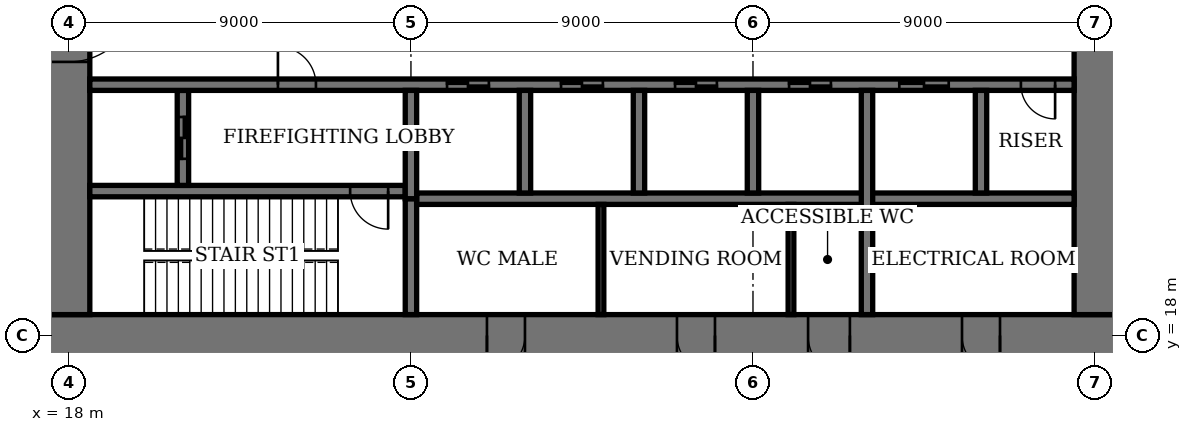
"""IFC4 building model, lengths in metres.
Left out: names, types, materials, properties, quantities, classifications, styles, units other than length and angle.
Written with IfcOpenShell. Run it as: python <this file> out.ifc"""

import sys

from ifc_helpers import new_model, si_unit, direction, frame, frame_2d, origin, place, context, subcontext, project, spatial, rectangle, extrude, element, fill, save


model = new_model("IFC4")
c1 = context("Model", 3, precision=1e-05, world=origin(), true_north=direction((0.0, 1.0)))
c2 = subcontext(c1, "Body", "Model", "MODEL_VIEW")
j1 = project(units=[si_unit("LENGTHUNIT", "METRE"), si_unit("PLANEANGLEUNIT", "RADIAN")], contexts=[c1])
p1 = place(None, origin())
s1 = spatial("IfcSite", under=j1, at=p1, CompositionType="ELEMENT")
p2 = place(p1, origin())
s2 = spatial("IfcBuilding", under=s1, at=p2, CompositionType="ELEMENT")
p3 = place(p2, frame((0.0, 0.0, 5.4)))
s3 = spatial("IfcBuildingStorey", under=s2, at=p3, CompositionType="ELEMENT", Elevation=5.4)
p4 = place(p3, frame((17.45, 18.0, 0.0), z_axis=(0.0, 0.0, 1.0), x_axis=(1.0, 0.0, 0.0)))
e1 = element("IfcWall", 1, at=p4, inside=s3, PredefinedType="SHEAR", context=c2, shape_type="SweptSolid", body=[
    extrude(rectangle(XDim=28.1, YDim=1.1, at=frame_2d((14.05, 0.0))), origin(), (0.0, 0.0, 1.0), 5.4),
])
p5 = place(p4, frame((11.55, 0.0, 0.0)))
e2 = element("IfcOpeningElement", 2, at=p5, cuts=e1, PredefinedType="OPENING", context=c2, shape_type="SweptSolid", body=[
    extrude(rectangle(XDim=1.0, YDim=2.4, at=frame_2d((0.5, 1.2))), frame((0.0, 0.56, 0.0), z_axis=(0.0, -1.0, 0.0), x_axis=(1.0, 0.0, 0.0)), (0.0, 0.0, 1.0), 1.12),
])
p6 = place(p4, frame((16.55, 0.0, 0.0)))
e3 = element("IfcOpeningElement", 3, at=p6, cuts=e1, PredefinedType="OPENING", context=c2, shape_type="SweptSolid", body=[
    extrude(rectangle(XDim=1.0, YDim=2.4, at=frame_2d((0.5, 1.2))), frame((0.0, 0.56, 0.0), z_axis=(0.0, -1.0, 0.0), x_axis=(1.0, 0.0, 0.0)), (0.0, 0.0, 1.0), 1.12),
])
p7 = place(p4, frame((20.0, 0.0, 0.0)))
e4 = element("IfcOpeningElement", 4, at=p7, cuts=e1, PredefinedType="OPENING", context=c2, shape_type="SweptSolid", body=[
    extrude(rectangle(XDim=1.1, YDim=2.4, at=frame_2d((0.55, 1.2))), frame((0.0, 0.56, 0.0), z_axis=(0.0, -1.0, 0.0), x_axis=(1.0, 0.0, 0.0)), (0.0, 0.0, 1.0), 1.12),
])
p8 = place(p4, frame((24.05, 0.0, 0.0)))
e5 = element("IfcOpeningElement", 5, at=p8, cuts=e1, PredefinedType="OPENING", context=c2, shape_type="SweptSolid", body=[
    extrude(rectangle(XDim=1.0, YDim=2.4, at=frame_2d((0.5, 1.2))), frame((0.0, 0.56, 0.0), z_axis=(0.0, -1.0, 0.0), x_axis=(1.0, 0.0, 0.0)), (0.0, 0.0, 1.0), 1.12),
])
p9 = place(p3, frame((18.0, 35.45, 0.0), z_axis=(0.0, 0.0, 1.0), x_axis=(0.0, -1.0, 0.0)))
e6 = element("IfcWall", 6, at=p9, inside=s3, PredefinedType="SHEAR", context=c2, shape_type="SweptSolid", body=[
    extrude(rectangle(XDim=16.9, YDim=1.1, at=frame_2d((8.45, 0.0))), origin(), (0.0, 0.0, 1.0), 5.4),
])
p10 = place(p9, frame((8.45, 0.0, 0.0)))
e7 = element("IfcOpeningElement", 7, at=p10, cuts=e6, PredefinedType="OPENING", context=c2, shape_type="SweptSolid", body=[
    extrude(rectangle(XDim=1.8, YDim=2.4, at=frame_2d((0.9, 1.2))), frame((0.0, 0.56, 0.0), z_axis=(0.0, -1.0, 0.0), x_axis=(1.0, 0.0, 0.0)), (0.0, 0.0, 1.0), 1.12),
])
p11 = place(p3, frame((45.0, 18.55, 0.0), z_axis=(0.0, 0.0, 1.0), x_axis=(0.0, 1.0, 0.0)))
e8 = element("IfcWall", 8, at=p11, inside=s3, PredefinedType="SHEAR", context=c2, shape_type="SweptSolid", body=[
    extrude(rectangle(XDim=16.9, YDim=1.1, at=frame_2d((8.45, 0.0))), origin(), (0.0, 0.0, 1.0), 5.4),
])
p12 = place(p11, frame((8.45, 0.0, 0.0)))
e9 = element("IfcOpeningElement", 9, at=p12, cuts=e8, PredefinedType="OPENING", context=c2, shape_type="SweptSolid", body=[
    extrude(rectangle(XDim=1.8, YDim=2.4, at=frame_2d((0.9, 1.2))), frame((0.0, 0.56, 0.0), z_axis=(0.0, -1.0, 0.0), x_axis=(1.0, 0.0, 0.0)), (0.0, 0.0, 1.0), 1.12),
])
p13 = place(p3, frame((18.55, 21.8, 0.0), z_axis=(0.0, 0.0, 1.0), x_axis=(1.0, 0.0, 0.0)))
e10 = element("IfcWall", 10, at=p13, inside=s3, PredefinedType="SHEAR", context=c2, shape_type="SweptSolid", body=[
    extrude(rectangle(XDim=8.3, YDim=0.3, at=frame_2d((4.15, 0.0))), origin(), (0.0, 0.0, 1.0), 5.4),
])
p14 = place(p13, frame((6.85, 0.0, 0.0)))
e11 = element("IfcOpeningElement", 11, at=p14, cuts=e10, PredefinedType="OPENING", context=c2, shape_type="SweptSolid", body=[
    extrude(rectangle(XDim=1.0, YDim=2.4, at=frame_2d((0.5, 1.2))), frame((0.0, 0.16, 0.0), z_axis=(0.0, -1.0, 0.0), x_axis=(1.0, 0.0, 0.0)), (0.0, 0.0, 1.0), 0.32),
])
p15 = place(p3, frame((27.0, 18.55, 0.0), z_axis=(0.0, 0.0, 1.0), x_axis=(0.0, 1.0, 0.0)))
e12 = element("IfcWall", 12, at=p15, inside=s3, PredefinedType="SHEAR", context=c2, shape_type="SweptSolid", body=[
    extrude(rectangle(XDim=3.05, YDim=0.3, at=frame_2d((1.525, 0.0))), origin(), (0.0, 0.0, 1.0), 5.4),
])
p16 = place(p3, frame((21.0, 21.95, 0.0), z_axis=(0.0, 0.0, 1.0), x_axis=(0.0, 1.0, 0.0)))
e13 = element("IfcWall", 13, at=p16, inside=s3, PredefinedType="SHEAR", context=c2, shape_type="SweptSolid", body=[
    extrude(rectangle(XDim=2.5, YDim=0.3, at=frame_2d((1.25, 0.0))), origin(), (0.0, 0.0, 1.0), 5.4),
])
p17 = place(p16, frame((0.7, 0.0, 0.0)))
e14 = element("IfcOpeningElement", 14, at=p17, cuts=e13, PredefinedType="OPENING", context=c2, shape_type="SweptSolid", body=[
    extrude(rectangle(XDim=1.1, YDim=2.4, at=frame_2d((0.55, 1.2))), frame((0.0, 0.16, 0.0), z_axis=(0.0, -1.0, 0.0), x_axis=(1.0, 0.0, 0.0)), (0.0, 0.0, 1.0), 0.32),
])
p18 = place(p3, frame((18.55, 24.6, 0.0), z_axis=(0.0, 0.0, 1.0), x_axis=(1.0, 0.0, 0.0)))
e15 = element("IfcWall", 15, at=p18, inside=s3, PredefinedType="SHEAR", context=c2, shape_type="SweptSolid", body=[
    extrude(rectangle(XDim=25.9, YDim=0.3, at=frame_2d((12.95, 0.0))), origin(), (0.0, 0.0, 1.0), 5.4),
])
p19 = place(p18, frame((4.95, 0.0, 0.0)))
e16 = element("IfcOpeningElement", 16, at=p19, cuts=e15, PredefinedType="OPENING", context=c2, shape_type="SweptSolid", body=[
    extrude(rectangle(XDim=1.0, YDim=2.4, at=frame_2d((0.5, 1.2))), frame((0.0, 0.16, 0.0), z_axis=(0.0, -1.0, 0.0), x_axis=(1.0, 0.0, 0.0)), (0.0, 0.0, 1.0), 0.32),
])
p20 = place(p18, frame((24.5, 0.0, 0.0)))
e17 = element("IfcOpeningElement", 17, at=p20, cuts=e15, PredefinedType="OPENING", context=c2, shape_type="SweptSolid", body=[
    extrude(rectangle(XDim=0.9, YDim=2.1, at=frame_2d((0.45, 1.05))), frame((0.0, 0.16, 0.0), z_axis=(0.0, -1.0, 0.0), x_axis=(1.0, 0.0, 0.0)), (0.0, 0.0, 1.0), 0.32),
])
p21 = place(p18, frame((9.4, 0.0, 0.0)))
e18 = element("IfcOpeningElement", 18, at=p21, cuts=e15, PredefinedType="OPENING", context=c2, shape_type="SweptSolid", body=[
    extrude(rectangle(XDim=1.1, YDim=2.4, at=frame_2d((0.55, 1.2))), frame((0.0, 0.16, 0.0), z_axis=(0.0, -1.0, 0.0), x_axis=(1.0, 0.0, 0.0)), (0.0, 0.0, 1.0), 0.32),
])
p22 = place(p18, frame((12.4, 0.0, 0.0)))
e19 = element("IfcOpeningElement", 19, at=p22, cuts=e15, PredefinedType="OPENING", context=c2, shape_type="SweptSolid", body=[
    extrude(rectangle(XDim=1.1, YDim=2.4, at=frame_2d((0.55, 1.2))), frame((0.0, 0.16, 0.0), z_axis=(0.0, -1.0, 0.0), x_axis=(1.0, 0.0, 0.0)), (0.0, 0.0, 1.0), 0.32),
])
p23 = place(p18, frame((15.4, 0.0, 0.0)))
e20 = element("IfcOpeningElement", 20, at=p23, cuts=e15, PredefinedType="OPENING", context=c2, shape_type="SweptSolid", body=[
    extrude(rectangle(XDim=1.1, YDim=2.4, at=frame_2d((0.55, 1.2))), frame((0.0, 0.16, 0.0), z_axis=(0.0, -1.0, 0.0), x_axis=(1.0, 0.0, 0.0)), (0.0, 0.0, 1.0), 0.32),
])
p24 = place(p18, frame((18.4, 0.0, 0.0)))
e21 = element("IfcOpeningElement", 21, at=p24, cuts=e15, PredefinedType="OPENING", context=c2, shape_type="SweptSolid", body=[
    extrude(rectangle(XDim=1.1, YDim=2.4, at=frame_2d((0.55, 1.2))), frame((0.0, 0.16, 0.0), z_axis=(0.0, -1.0, 0.0), x_axis=(1.0, 0.0, 0.0)), (0.0, 0.0, 1.0), 0.32),
])
p25 = place(p18, frame((21.3, 0.0, 0.0)))
e22 = element("IfcOpeningElement", 22, at=p25, cuts=e15, PredefinedType="OPENING", context=c2, shape_type="SweptSolid", body=[
    extrude(rectangle(XDim=1.3, YDim=2.4, at=frame_2d((0.65, 1.2))), frame((0.0, 0.16, 0.0), z_axis=(0.0, -1.0, 0.0), x_axis=(1.0, 0.0, 0.0)), (0.0, 0.0, 1.0), 0.32),
])
p26 = place(p3, frame((27.15, 21.6, 0.0), z_axis=(0.0, 0.0, 1.0), x_axis=(1.0, 0.0, 0.0)))
e23 = element("IfcWall", 23, at=p26, inside=s3, PredefinedType="SHEAR", context=c2, shape_type="SweptSolid", body=[
    extrude(rectangle(XDim=17.3, YDim=0.3, at=frame_2d((8.65, 0.0))), origin(), (0.0, 0.0, 1.0), 5.4),
])
for number, where, z_axis, x_axis in (
    (24, (30.0, 21.75, 0.0), (0.0, 0.0, 1.0), (0.0, 1.0, 0.0)),
    (25, (33.0, 21.75, 0.0), (0.0, 0.0, 1.0), (0.0, 1.0, 0.0)),
    (26, (36.0, 21.75, 0.0), (0.0, 0.0, 1.0), (0.0, 1.0, 0.0)),
):
    element("IfcWall", number, at=place(p3, frame(where, z_axis=z_axis, x_axis=x_axis)), inside=s3, PredefinedType="SHEAR", context=c2, shape_type="SweptSolid", body=[
        extrude(rectangle(XDim=2.7, YDim=0.3, at=frame_2d((1.35, 0.0))), origin(), (0.0, 0.0, 1.0), 5.4),
    ])
p27 = place(p3, frame((39.0, 18.55, 0.0), z_axis=(0.0, 0.0, 1.0), x_axis=(0.0, 1.0, 0.0)))
e27 = element("IfcWall", 27, at=p27, inside=s3, PredefinedType="SHEAR", context=c2, shape_type="SweptSolid", body=[
    extrude(rectangle(XDim=5.9, YDim=0.3, at=frame_2d((2.95, 0.0))), origin(), (0.0, 0.0, 1.0), 5.4),
])
p28 = place(p3, frame((42.0, 21.75, 0.0), z_axis=(0.0, 0.0, 1.0), x_axis=(0.0, 1.0, 0.0)))
e28 = element("IfcWall", 28, at=p28, inside=s3, PredefinedType="SHEAR", context=c2, shape_type="SweptSolid", body=[
    extrude(rectangle(XDim=2.7, YDim=0.3, at=frame_2d((1.35, 0.0))), origin(), (0.0, 0.0, 1.0), 5.4),
])
p29 = place(p3, frame((27.0, 21.6, 0.0), z_axis=(0.0, 0.0, 1.0), x_axis=(0.0, 1.0, 0.0)))
e29 = element("IfcWall", 29, at=p29, inside=s3, PredefinedType="SHEAR", context=c2, shape_type="SweptSolid", body=[
    extrude(rectangle(XDim=2.85, YDim=0.3, at=frame_2d((1.425, 0.0))), origin(), (0.0, 0.0, 1.0), 5.4),
])
for number, where, z_axis, x_axis in (
    (30, (32.0, 18.55, 0.0), (0.0, 0.0, 1.0), (0.0, 1.0, 0.0)),
    (31, (37.0, 18.55, 0.0), (0.0, 0.0, 1.0), (0.0, 1.0, 0.0)),
):
    element("IfcWall", number, at=place(p3, frame(where, z_axis=z_axis, x_axis=x_axis)), inside=s3, PredefinedType="PARTITIONING", context=c2, shape_type="SweptSolid", body=[
        extrude(rectangle(XDim=2.9, YDim=0.15, at=frame_2d((1.45, 0.0))), origin(), (0.0, 0.0, 1.0), 5.1),
    ])
p30 = place(p10, origin())
e32 = element("IfcDoor", 32, at=p30, inside=s3, OperationType="DOUBLE_DOOR_DOUBLE_SWING", PredefinedType="DOOR", context=c2, shape_type="SweptSolid", body=[
    extrude(rectangle(XDim=1.8, YDim=2.4, at=frame_2d((0.9, 1.2))), frame((0.0, 0.03, 0.0), z_axis=(0.0, -1.0, 0.0), x_axis=(1.0, 0.0, 0.0)), (0.0, 0.0, 1.0), 0.06),
    extrude(rectangle(XDim=0.04, YDim=2.4, at=frame_2d((0.02, 1.2))), frame((0.0, 0.55, 0.0), z_axis=(0.0, -1.0, 0.0), x_axis=(1.0, 0.0, 0.0)), (0.0, 0.0, 1.0), 1.1),
    extrude(rectangle(XDim=0.04, YDim=2.4, at=frame_2d((1.78, 1.2))), frame((0.0, 0.55, 0.0), z_axis=(0.0, -1.0, 0.0), x_axis=(1.0, 0.0, 0.0)), (0.0, 0.0, 1.0), 1.1),
    extrude(rectangle(XDim=1.8, YDim=0.04, at=frame_2d((0.9, 2.38))), frame((0.0, 0.55, 0.0), z_axis=(0.0, -1.0, 0.0), x_axis=(1.0, 0.0, 0.0)), (0.0, 0.0, 1.0), 1.1),
])
fill(e7, e32)
p31 = place(p5, origin())
e33 = element("IfcDoor", 33, at=p31, inside=s3, OperationType="SINGLE_SWING_LEFT", PredefinedType="DOOR", context=c2, shape_type="SweptSolid", body=[
    extrude(rectangle(XDim=1.0, YDim=2.4, at=frame_2d((0.5, 1.2))), frame((0.0, 0.025, 0.0), z_axis=(0.0, -1.0, 0.0), x_axis=(1.0, 0.0, 0.0)), (0.0, 0.0, 1.0), 0.05),
    extrude(rectangle(XDim=0.04, YDim=2.4, at=frame_2d((0.02, 1.2))), frame((0.0, 0.4, 0.0), z_axis=(0.0, -1.0, 0.0), x_axis=(1.0, 0.0, 0.0)), (0.0, 0.0, 1.0), 0.8),
    extrude(rectangle(XDim=0.04, YDim=2.4, at=frame_2d((0.98, 1.2))), frame((0.0, 0.4, 0.0), z_axis=(0.0, -1.0, 0.0), x_axis=(1.0, 0.0, 0.0)), (0.0, 0.0, 1.0), 0.8),
    extrude(rectangle(XDim=1.0, YDim=0.04, at=frame_2d((0.5, 2.38))), frame((0.0, 0.4, 0.0), z_axis=(0.0, -1.0, 0.0), x_axis=(1.0, 0.0, 0.0)), (0.0, 0.0, 1.0), 0.8),
])
fill(e2, e33)
p32 = place(p6, origin())
e34 = element("IfcDoor", 34, at=p32, inside=s3, OperationType="SINGLE_SWING_RIGHT", PredefinedType="DOOR", context=c2, shape_type="SweptSolid", body=[
    extrude(rectangle(XDim=1.0, YDim=2.4, at=frame_2d((0.5, 1.2))), frame((0.0, 0.025, 0.0), z_axis=(0.0, -1.0, 0.0), x_axis=(1.0, 0.0, 0.0)), (0.0, 0.0, 1.0), 0.05),
    extrude(rectangle(XDim=0.04, YDim=2.4, at=frame_2d((0.02, 1.2))), frame((0.0, 0.4, 0.0), z_axis=(0.0, -1.0, 0.0), x_axis=(1.0, 0.0, 0.0)), (0.0, 0.0, 1.0), 0.8),
    extrude(rectangle(XDim=0.04, YDim=2.4, at=frame_2d((0.98, 1.2))), frame((0.0, 0.4, 0.0), z_axis=(0.0, -1.0, 0.0), x_axis=(1.0, 0.0, 0.0)), (0.0, 0.0, 1.0), 0.8),
    extrude(rectangle(XDim=1.0, YDim=0.04, at=frame_2d((0.5, 2.38))), frame((0.0, 0.4, 0.0), z_axis=(0.0, -1.0, 0.0), x_axis=(1.0, 0.0, 0.0)), (0.0, 0.0, 1.0), 0.8),
])
fill(e3, e34)
p33 = place(p7, origin())
e35 = element("IfcDoor", 35, at=p33, inside=s3, OperationType="SINGLE_SWING_RIGHT", PredefinedType="DOOR", context=c2, shape_type="SweptSolid", body=[
    extrude(rectangle(XDim=1.1, YDim=2.4, at=frame_2d((0.55, 1.2))), frame((0.0, 0.025, 0.0), z_axis=(0.0, -1.0, 0.0), x_axis=(1.0, 0.0, 0.0)), (0.0, 0.0, 1.0), 0.05),
    extrude(rectangle(XDim=0.04, YDim=2.4, at=frame_2d((0.02, 1.2))), frame((0.0, 0.44, 0.0), z_axis=(0.0, -1.0, 0.0), x_axis=(1.0, 0.0, 0.0)), (0.0, 0.0, 1.0), 0.88),
    extrude(rectangle(XDim=0.04, YDim=2.4, at=frame_2d((1.08, 1.2))), frame((0.0, 0.44, 0.0), z_axis=(0.0, -1.0, 0.0), x_axis=(1.0, 0.0, 0.0)), (0.0, 0.0, 1.0), 0.88),
    extrude(rectangle(XDim=1.1, YDim=0.04, at=frame_2d((0.55, 2.38))), frame((0.0, 0.44, 0.0), z_axis=(0.0, -1.0, 0.0), x_axis=(1.0, 0.0, 0.0)), (0.0, 0.0, 1.0), 0.88),
])
fill(e4, e35)
p34 = place(p8, origin())
e36 = element("IfcDoor", 36, at=p34, inside=s3, OperationType="SINGLE_SWING_RIGHT", PredefinedType="DOOR", context=c2, shape_type="SweptSolid", body=[
    extrude(rectangle(XDim=1.0, YDim=2.4, at=frame_2d((0.5, 1.2))), frame((0.0, 0.025, 0.0), z_axis=(0.0, -1.0, 0.0), x_axis=(1.0, 0.0, 0.0)), (0.0, 0.0, 1.0), 0.05),
    extrude(rectangle(XDim=0.04, YDim=2.4, at=frame_2d((0.02, 1.2))), frame((0.0, 0.4, 0.0), z_axis=(0.0, -1.0, 0.0), x_axis=(1.0, 0.0, 0.0)), (0.0, 0.0, 1.0), 0.8),
    extrude(rectangle(XDim=0.04, YDim=2.4, at=frame_2d((0.98, 1.2))), frame((0.0, 0.4, 0.0), z_axis=(0.0, -1.0, 0.0), x_axis=(1.0, 0.0, 0.0)), (0.0, 0.0, 1.0), 0.8),
    extrude(rectangle(XDim=1.0, YDim=0.04, at=frame_2d((0.5, 2.38))), frame((0.0, 0.4, 0.0), z_axis=(0.0, -1.0, 0.0), x_axis=(1.0, 0.0, 0.0)), (0.0, 0.0, 1.0), 0.8),
])
fill(e5, e36)
p35 = place(p14, origin())
e37 = element("IfcDoor", 37, at=p35, inside=s3, OperationType="SINGLE_SWING_RIGHT", PredefinedType="DOOR", context=c2, shape_type="SweptSolid", body=[
    extrude(rectangle(XDim=1.0, YDim=2.4, at=frame_2d((0.5, 1.2))), frame((0.0, 0.03, 0.0), z_axis=(0.0, -1.0, 0.0), x_axis=(1.0, 0.0, 0.0)), (0.0, 0.0, 1.0), 0.06),
])
fill(e11, e37)
p36 = place(p19, origin())
e38 = element("IfcDoor", 38, at=p36, inside=s3, OperationType="SINGLE_SWING_RIGHT", PredefinedType="DOOR", context=c2, shape_type="SweptSolid", body=[
    extrude(rectangle(XDim=1.0, YDim=2.4, at=frame_2d((0.5, 1.2))), frame((0.0, 0.03, 0.0), z_axis=(0.0, -1.0, 0.0), x_axis=(1.0, 0.0, 0.0)), (0.0, 0.0, 1.0), 0.06),
])
fill(e16, e38)
p37 = place(p20, origin())
e39 = element("IfcDoor", 39, at=p37, inside=s3, OperationType="SINGLE_SWING_RIGHT", PredefinedType="DOOR", context=c2, shape_type="SweptSolid", body=[
    extrude(rectangle(XDim=0.9, YDim=2.1, at=frame_2d((0.45, 1.05))), frame((0.0, 0.03, 0.0), z_axis=(0.0, -1.0, 0.0), x_axis=(1.0, 0.0, 0.0)), (0.0, 0.0, 1.0), 0.06),
])
fill(e17, e39)
p38 = place(p21, origin())
e40 = element("IfcDoor", 40, at=p38, inside=s3, OperationType="DOUBLE_DOOR_SLIDING", PredefinedType="DOOR", context=c2, shape_type="SweptSolid", body=[
    extrude(rectangle(XDim=1.1, YDim=2.4, at=frame_2d((0.55, 1.2))), frame((0.0, 0.02, 0.0), z_axis=(0.0, -1.0, 0.0), x_axis=(1.0, 0.0, 0.0)), (0.0, 0.0, 1.0), 0.04),
])
fill(e18, e40)
p39 = place(p22, origin())
e41 = element("IfcDoor", 41, at=p39, inside=s3, OperationType="DOUBLE_DOOR_SLIDING", PredefinedType="DOOR", context=c2, shape_type="SweptSolid", body=[
    extrude(rectangle(XDim=1.1, YDim=2.4, at=frame_2d((0.55, 1.2))), frame((0.0, 0.02, 0.0), z_axis=(0.0, -1.0, 0.0), x_axis=(1.0, 0.0, 0.0)), (0.0, 0.0, 1.0), 0.04),
])
fill(e19, e41)
p40 = place(p23, origin())
e42 = element("IfcDoor", 42, at=p40, inside=s3, OperationType="DOUBLE_DOOR_SLIDING", PredefinedType="DOOR", context=c2, shape_type="SweptSolid", body=[
    extrude(rectangle(XDim=1.1, YDim=2.4, at=frame_2d((0.55, 1.2))), frame((0.0, 0.02, 0.0), z_axis=(0.0, -1.0, 0.0), x_axis=(1.0, 0.0, 0.0)), (0.0, 0.0, 1.0), 0.04),
])
fill(e20, e42)
p41 = place(p24, origin())
e43 = element("IfcDoor", 43, at=p41, inside=s3, OperationType="DOUBLE_DOOR_SLIDING", PredefinedType="DOOR", context=c2, shape_type="SweptSolid", body=[
    extrude(rectangle(XDim=1.1, YDim=2.4, at=frame_2d((0.55, 1.2))), frame((0.0, 0.02, 0.0), z_axis=(0.0, -1.0, 0.0), x_axis=(1.0, 0.0, 0.0)), (0.0, 0.0, 1.0), 0.04),
])
fill(e21, e43)
p42 = place(p25, origin())
e44 = element("IfcDoor", 44, at=p42, inside=s3, OperationType="DOUBLE_DOOR_SLIDING", PredefinedType="DOOR", context=c2, shape_type="SweptSolid", body=[
    extrude(rectangle(XDim=1.3, YDim=2.4, at=frame_2d((0.65, 1.2))), frame((0.0, 0.02, 0.0), z_axis=(0.0, -1.0, 0.0), x_axis=(1.0, 0.0, 0.0)), (0.0, 0.0, 1.0), 0.04),
])
fill(e22, e44)
p43 = place(p17, origin())
e45 = element("IfcDoor", 45, at=p43, inside=s3, OperationType="DOUBLE_DOOR_SLIDING", PredefinedType="DOOR", context=c2, shape_type="SweptSolid", body=[
    extrude(rectangle(XDim=1.1, YDim=2.4, at=frame_2d((0.55, 1.2))), frame((0.0, 0.03, 0.0), z_axis=(0.0, -1.0, 0.0), x_axis=(1.0, 0.0, 0.0)), (0.0, 0.0, 1.0), 0.06),
])
fill(e14, e45)
save(model, sys.argv[1])
